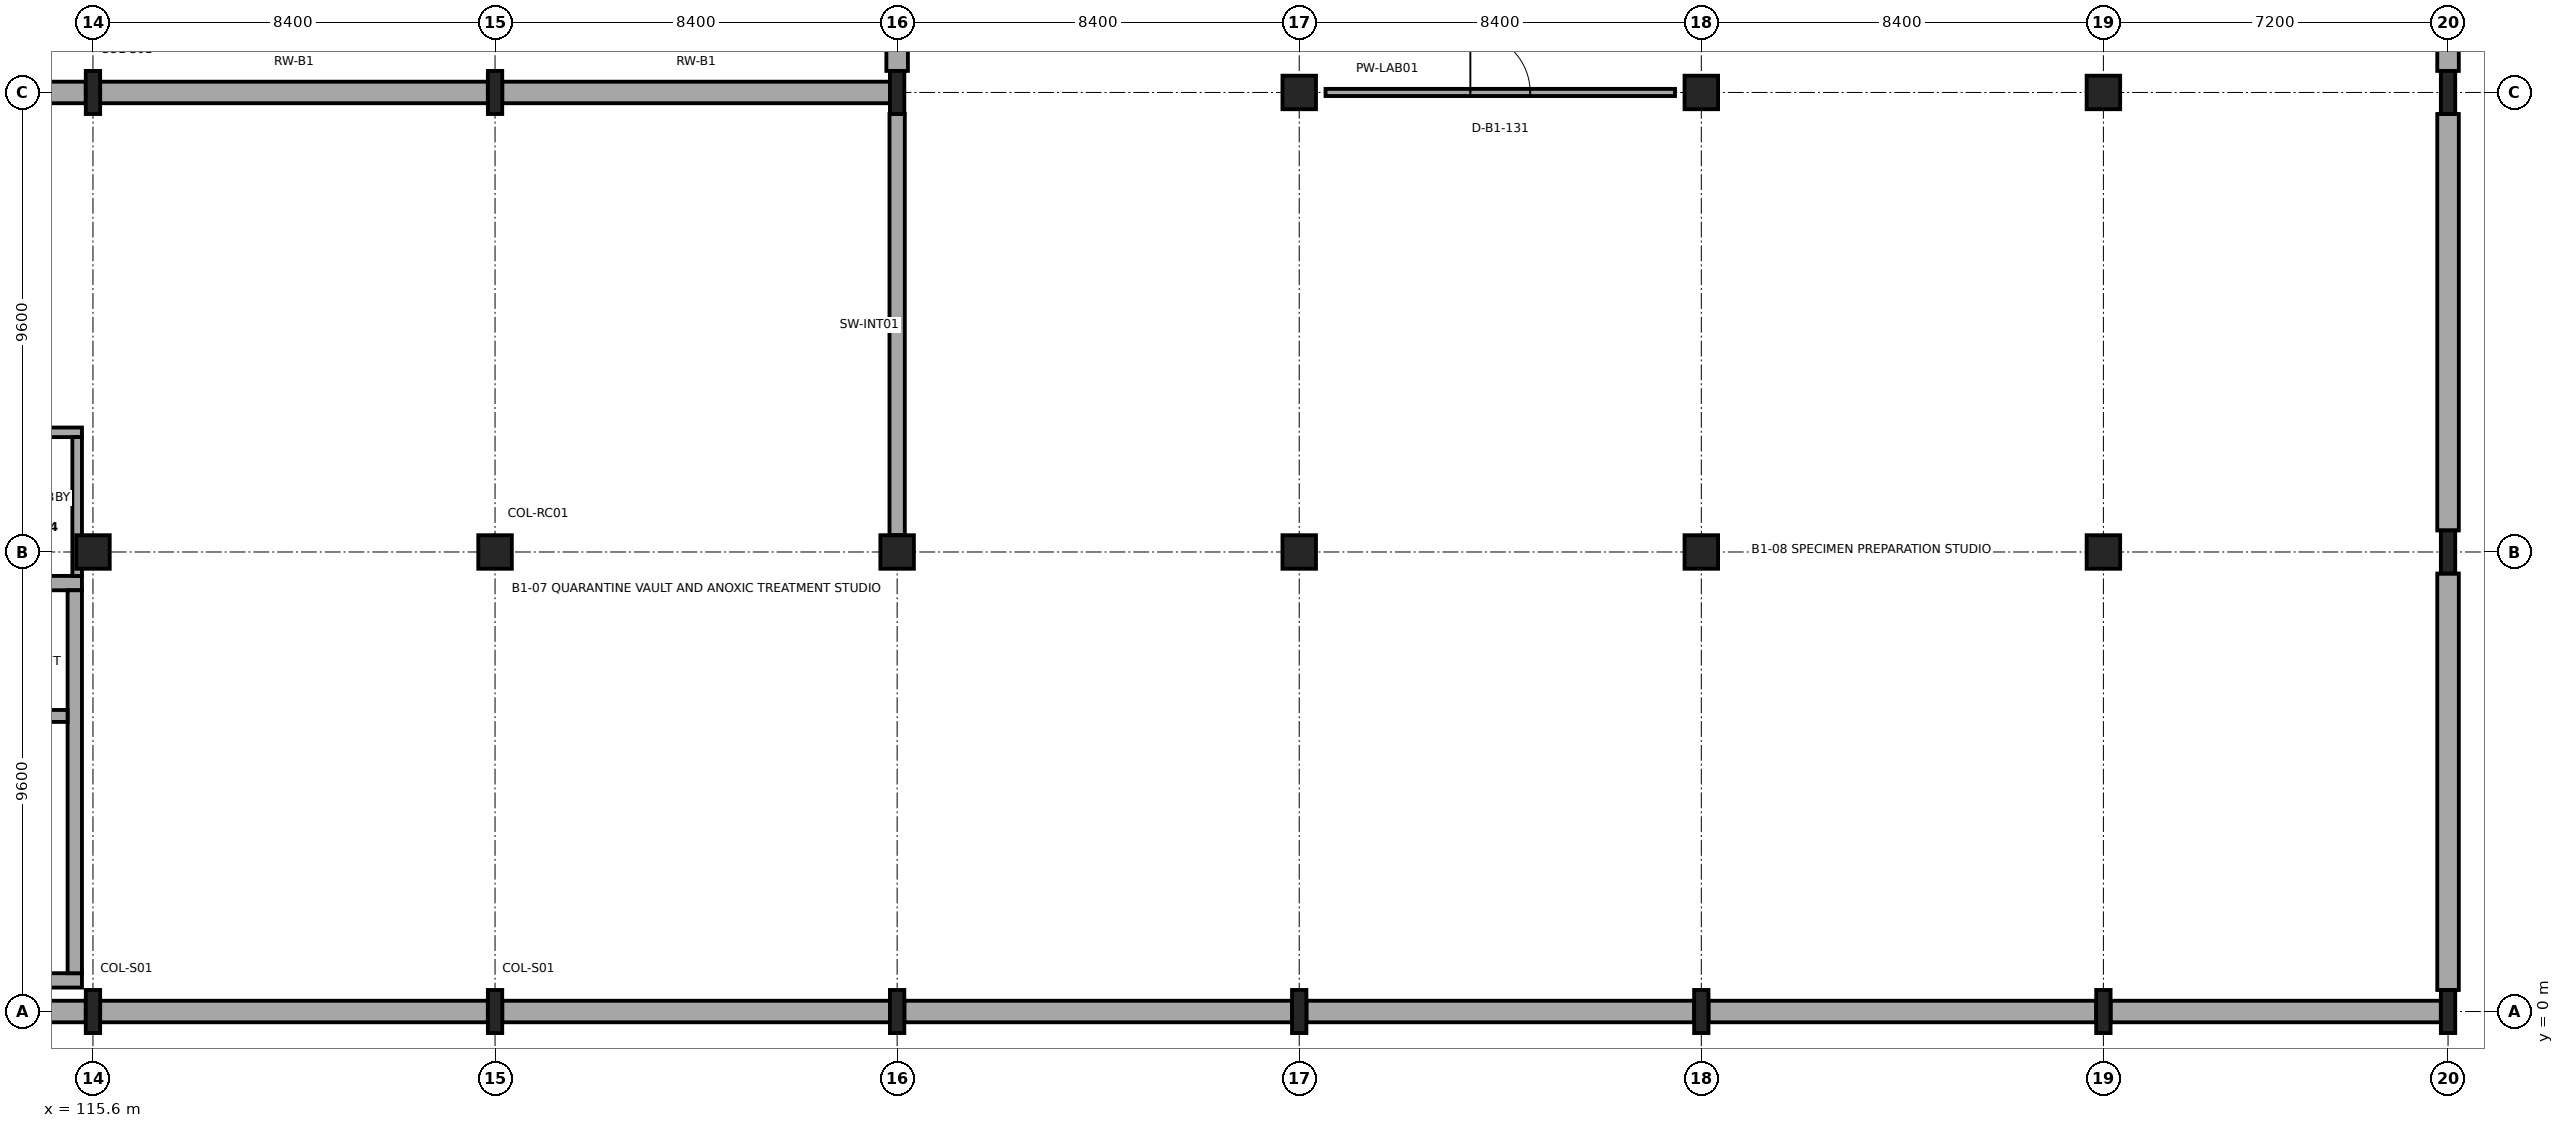
"""IFC4 building model, lengths in metres.
Left out: names, types, materials, properties, quantities, classifications, styles, units other than length and angle.
Written with IfcOpenShell. Run it as: python <this file> out.ifc"""

import sys

from ifc_helpers import new_model, si_unit, direction, frame, frame_2d, origin, origin_2d, place, context, subcontext, project, spatial, rectangle, i_section, extrude, element, fill, save


model = new_model("IFC4")
c1 = context("Model", 3, precision=1e-05, world=origin(), true_north=direction((0.0, 1.0)))
c2 = subcontext(c1, "Body", "Model", "MODEL_VIEW")
j1 = project(units=[si_unit("LENGTHUNIT", "METRE"), si_unit("PLANEANGLEUNIT", "RADIAN")], contexts=[c1])
p1 = place(None, origin())
s1 = spatial("IfcSite", under=j1, at=p1, CompositionType="ELEMENT")
p2 = place(p1, origin())
s2 = spatial("IfcBuilding", under=s1, at=p2, CompositionType="ELEMENT")
p3 = place(p2, frame((0.0, 0.0, -4.8)))
s3 = spatial("IfcBuildingStorey", under=s2, at=p3, CompositionType="ELEMENT", Elevation=-4.8)
p4 = place(p3, frame((115.6, 0.0, 0.0), z_axis=(0.0, 0.0, 1.0), x_axis=(1.0, 0.0, 0.0)))
e1 = element("IfcColumn", 1, at=p4, inside=s3, PredefinedType="COLUMN", context=c2, shape_type="SweptSolid", body=[
    extrude(i_section(OverallWidth=0.3, OverallDepth=0.9, WebThickness=0.019, FlangeThickness=0.035, FilletRadius=0.03, at=origin_2d()), origin(), (0.0, 0.0, 1.0), 4.8),
])
p5 = place(p3, frame((115.6, 9.6, 0.0), z_axis=(0.0, 0.0, 1.0), x_axis=(1.0, 0.0, 0.0)))
e2 = element("IfcColumn", 2, at=p5, inside=s3, PredefinedType="COLUMN", context=c2, shape_type="SweptSolid", body=[
    extrude(rectangle(XDim=0.7, YDim=0.7, at=origin_2d()), origin(), (0.0, 0.0, 1.0), 4.8),
])
for number, where, z_axis, x_axis in (
    (3, (115.6, 19.2, 0.0), (0.0, 0.0, 1.0), (1.0, 0.0, 0.0)),
    (4, (124.0, 0.0, 0.0), (0.0, 0.0, 1.0), (1.0, 0.0, 0.0)),
):
    element("IfcColumn", number, at=place(p3, frame(where, z_axis=z_axis, x_axis=x_axis)), inside=s3, PredefinedType="COLUMN", context=c2, shape_type="SweptSolid", body=[
        extrude(i_section(OverallWidth=0.3, OverallDepth=0.9, WebThickness=0.019, FlangeThickness=0.035, FilletRadius=0.03, at=origin_2d()), origin(), (0.0, 0.0, 1.0), 4.8),
    ])
p6 = place(p3, frame((124.0, 9.6, 0.0), z_axis=(0.0, 0.0, 1.0), x_axis=(1.0, 0.0, 0.0)))
e5 = element("IfcColumn", 5, at=p6, inside=s3, PredefinedType="COLUMN", context=c2, shape_type="SweptSolid", body=[
    extrude(rectangle(XDim=0.7, YDim=0.7, at=origin_2d()), origin(), (0.0, 0.0, 1.0), 4.8),
])
for number, where, z_axis, x_axis in (
    (6, (124.0, 19.2, 0.0), (0.0, 0.0, 1.0), (1.0, 0.0, 0.0)),
    (7, (132.4, 0.0, 0.0), (0.0, 0.0, 1.0), (1.0, 0.0, 0.0)),
):
    element("IfcColumn", number, at=place(p3, frame(where, z_axis=z_axis, x_axis=x_axis)), inside=s3, PredefinedType="COLUMN", context=c2, shape_type="SweptSolid", body=[
        extrude(i_section(OverallWidth=0.3, OverallDepth=0.9, WebThickness=0.019, FlangeThickness=0.035, FilletRadius=0.03, at=origin_2d()), origin(), (0.0, 0.0, 1.0), 4.8),
    ])
p7 = place(p3, frame((132.4, 9.6, 0.0), z_axis=(0.0, 0.0, 1.0), x_axis=(1.0, 0.0, 0.0)))
e8 = element("IfcColumn", 8, at=p7, inside=s3, PredefinedType="COLUMN", context=c2, shape_type="SweptSolid", body=[
    extrude(rectangle(XDim=0.7, YDim=0.7, at=origin_2d()), origin(), (0.0, 0.0, 1.0), 4.8),
])
for number, where, z_axis, x_axis in (
    (9, (132.4, 19.2, 0.0), (0.0, 0.0, 1.0), (1.0, 0.0, 0.0)),
    (10, (140.8, 0.0, 0.0), (0.0, 0.0, 1.0), (1.0, 0.0, 0.0)),
):
    element("IfcColumn", number, at=place(p3, frame(where, z_axis=z_axis, x_axis=x_axis)), inside=s3, PredefinedType="COLUMN", context=c2, shape_type="SweptSolid", body=[
        extrude(i_section(OverallWidth=0.3, OverallDepth=0.9, WebThickness=0.019, FlangeThickness=0.035, FilletRadius=0.03, at=origin_2d()), origin(), (0.0, 0.0, 1.0), 4.8),
    ])
for number, where, z_axis, x_axis in (
    (11, (140.8, 9.6, 0.0), (0.0, 0.0, 1.0), (1.0, 0.0, 0.0)),
    (12, (140.8, 19.2, 0.0), (0.0, 0.0, 1.0), (1.0, 0.0, 0.0)),
):
    element("IfcColumn", number, at=place(p3, frame(where, z_axis=z_axis, x_axis=x_axis)), inside=s3, PredefinedType="COLUMN", context=c2, shape_type="SweptSolid", body=[
        extrude(rectangle(XDim=0.7, YDim=0.7, at=origin_2d()), origin(), (0.0, 0.0, 1.0), 4.8),
    ])
p8 = place(p3, frame((149.2, 0.0, 0.0), z_axis=(0.0, 0.0, 1.0), x_axis=(1.0, 0.0, 0.0)))
e13 = element("IfcColumn", 13, at=p8, inside=s3, PredefinedType="COLUMN", context=c2, shape_type="SweptSolid", body=[
    extrude(i_section(OverallWidth=0.3, OverallDepth=0.9, WebThickness=0.019, FlangeThickness=0.035, FilletRadius=0.03, at=origin_2d()), origin(), (0.0, 0.0, 1.0), 4.8),
])
for number, where, z_axis, x_axis in (
    (14, (149.2, 9.6, 0.0), (0.0, 0.0, 1.0), (1.0, 0.0, 0.0)),
    (15, (149.2, 19.2, 0.0), (0.0, 0.0, 1.0), (1.0, 0.0, 0.0)),
):
    element("IfcColumn", number, at=place(p3, frame(where, z_axis=z_axis, x_axis=x_axis)), inside=s3, PredefinedType="COLUMN", context=c2, shape_type="SweptSolid", body=[
        extrude(rectangle(XDim=0.7, YDim=0.7, at=origin_2d()), origin(), (0.0, 0.0, 1.0), 4.8),
    ])
p9 = place(p3, frame((157.6, 0.0, 0.0), z_axis=(0.0, 0.0, 1.0), x_axis=(1.0, 0.0, 0.0)))
e16 = element("IfcColumn", 16, at=p9, inside=s3, PredefinedType="COLUMN", context=c2, shape_type="SweptSolid", body=[
    extrude(i_section(OverallWidth=0.3, OverallDepth=0.9, WebThickness=0.019, FlangeThickness=0.035, FilletRadius=0.03, at=origin_2d()), origin(), (0.0, 0.0, 1.0), 4.8),
])
for number, where, z_axis, x_axis in (
    (17, (157.6, 9.6, 0.0), (0.0, 0.0, 1.0), (1.0, 0.0, 0.0)),
    (18, (157.6, 19.2, 0.0), (0.0, 0.0, 1.0), (1.0, 0.0, 0.0)),
):
    element("IfcColumn", number, at=place(p3, frame(where, z_axis=z_axis, x_axis=x_axis)), inside=s3, PredefinedType="COLUMN", context=c2, shape_type="SweptSolid", body=[
        extrude(rectangle(XDim=0.7, YDim=0.7, at=origin_2d()), origin(), (0.0, 0.0, 1.0), 4.8),
    ])
for number, where, z_axis, x_axis in (
    (19, (164.8, 0.0, 0.0), (0.0, 0.0, 1.0), (1.0, 0.0, 0.0)),
    (20, (164.8, 9.6, 0.0), (0.0, 0.0, 1.0), (1.0, 0.0, 0.0)),
    (21, (164.8, 19.2, 0.0), (0.0, 0.0, 1.0), (1.0, 0.0, 0.0)),
):
    element("IfcColumn", number, at=place(p3, frame(where, z_axis=z_axis, x_axis=x_axis)), inside=s3, PredefinedType="COLUMN", context=c2, shape_type="SweptSolid", body=[
        extrude(i_section(OverallWidth=0.3, OverallDepth=0.9, WebThickness=0.019, FlangeThickness=0.035, FilletRadius=0.03, at=origin_2d()), origin(), (0.0, 0.0, 1.0), 4.8),
    ])
p10 = place(p3, frame((107.35, 19.2, 0.0), z_axis=(0.0, 0.0, 1.0), x_axis=(1.0, 0.0, 0.0)))
e22 = element("IfcWall", 22, at=p10, inside=s3, PredefinedType="USERDEFINED", context=c2, shape_type="SweptSolid", body=[
    extrude(rectangle(XDim=8.1, YDim=0.45, at=frame_2d((4.05, 0.0))), origin(), (0.0, 0.0, 1.0), 4.48),
])
for number, where, z_axis, x_axis in (
    (23, (115.75, 19.2, 0.0), (0.0, 0.0, 1.0), (1.0, 0.0, 0.0)),
    (24, (124.15, 19.2, 0.0), (0.0, 0.0, 1.0), (1.0, 0.0, 0.0)),
):
    element("IfcWall", number, at=place(p3, frame(where, z_axis=z_axis, x_axis=x_axis)), inside=s3, PredefinedType="USERDEFINED", context=c2, shape_type="SweptSolid", body=[
        extrude(rectangle(XDim=8.1, YDim=0.45, at=frame_2d((4.05, 0.0))), origin(), (0.0, 0.0, 1.0), 4.48),
    ])
for number, where, z_axis, x_axis in (
    (25, (132.4, 19.65, 0.0), (0.0, 0.0, 1.0), (0.0, 1.0, 0.0)),
    (26, (164.8, 25.95, 0.0), (0.0, 0.0, 1.0), (0.0, -1.0, 0.0)),
):
    element("IfcWall", number, at=place(p3, frame(where, z_axis=z_axis, x_axis=x_axis)), inside=s3, PredefinedType="USERDEFINED", context=c2, shape_type="SweptSolid", body=[
        extrude(rectangle(XDim=6.3, YDim=0.45, at=frame_2d((3.15, 0.0))), origin(), (0.0, 0.0, 1.0), 4.48),
    ])
for number, where, z_axis, x_axis in (
    (27, (164.8, 18.75, 0.0), (0.0, 0.0, 1.0), (0.0, -1.0, 0.0)),
    (28, (164.8, 9.15, 0.0), (0.0, 0.0, 1.0), (0.0, -1.0, 0.0)),
):
    element("IfcWall", number, at=place(p3, frame(where, z_axis=z_axis, x_axis=x_axis)), inside=s3, PredefinedType="USERDEFINED", context=c2, shape_type="SweptSolid", body=[
        extrude(rectangle(XDim=8.7, YDim=0.45, at=frame_2d((4.35, 0.0))), origin(), (0.0, 0.0, 1.0), 4.48),
    ])
p11 = place(p3, frame((164.65, 0.0, 0.0), z_axis=(0.0, 0.0, 1.0), x_axis=(-1.0, 0.0, 0.0)))
e29 = element("IfcWall", 29, at=p11, inside=s3, PredefinedType="USERDEFINED", context=c2, shape_type="SweptSolid", body=[
    extrude(rectangle(XDim=6.9, YDim=0.45, at=frame_2d((3.45, 0.0))), origin(), (0.0, 0.0, 1.0), 4.48),
])
p12 = place(p3, frame((157.45, 0.0, 0.0), z_axis=(0.0, 0.0, 1.0), x_axis=(-1.0, 0.0, 0.0)))
e30 = element("IfcWall", 30, at=p12, inside=s3, PredefinedType="USERDEFINED", context=c2, shape_type="SweptSolid", body=[
    extrude(rectangle(XDim=8.1, YDim=0.45, at=frame_2d((4.05, 0.0))), origin(), (0.0, 0.0, 1.0), 4.48),
])
p13 = place(p3, frame((149.05, 0.0, 0.0), z_axis=(0.0, 0.0, 1.0), x_axis=(-1.0, 0.0, 0.0)))
e31 = element("IfcWall", 31, at=p13, inside=s3, PredefinedType="USERDEFINED", context=c2, shape_type="SweptSolid", body=[
    extrude(rectangle(XDim=8.1, YDim=0.45, at=frame_2d((4.05, 0.0))), origin(), (0.0, 0.0, 1.0), 4.48),
])
p14 = place(p3, frame((140.65, 0.0, 0.0), z_axis=(0.0, 0.0, 1.0), x_axis=(-1.0, 0.0, 0.0)))
e32 = element("IfcWall", 32, at=p14, inside=s3, PredefinedType="USERDEFINED", context=c2, shape_type="SweptSolid", body=[
    extrude(rectangle(XDim=8.1, YDim=0.45, at=frame_2d((4.05, 0.0))), origin(), (0.0, 0.0, 1.0), 4.48),
])
for number, where, z_axis, x_axis in (
    (33, (132.25, 0.0, 0.0), (0.0, 0.0, 1.0), (-1.0, 0.0, 0.0)),
    (34, (123.85, 0.0, 0.0), (0.0, 0.0, 1.0), (-1.0, 0.0, 0.0)),
):
    element("IfcWall", number, at=place(p3, frame(where, z_axis=z_axis, x_axis=x_axis)), inside=s3, PredefinedType="USERDEFINED", context=c2, shape_type="SweptSolid", body=[
        extrude(rectangle(XDim=8.1, YDim=0.45, at=frame_2d((4.05, 0.0))), origin(), (0.0, 0.0, 1.0), 4.48),
    ])
p15 = place(p3, frame((115.45, 0.0, 0.0), z_axis=(0.0, 0.0, 1.0), x_axis=(-1.0, 0.0, 0.0)))
e35 = element("IfcWall", 35, at=p15, inside=s3, PredefinedType="USERDEFINED", context=c2, shape_type="SweptSolid", body=[
    extrude(rectangle(XDim=8.1, YDim=0.45, at=frame_2d((4.05, 0.0))), origin(), (0.0, 0.0, 1.0), 4.48),
])
p16 = place(p3, frame((107.43, 0.65, 0.0), z_axis=(0.0, 0.0, 1.0), x_axis=(1.0, 0.0, 0.0)))
e36 = element("IfcWall", 36, at=p16, inside=s3, PredefinedType="SHEAR", context=c2, shape_type="SweptSolid", body=[
    extrude(rectangle(XDim=7.94, YDim=0.3, at=frame_2d((3.97, 0.0))), origin(), (0.0, 0.0, 1.0), 4.5),
])
p17 = place(p3, frame((115.37, 8.95, 0.0), z_axis=(0.0, 0.0, 1.0), x_axis=(-1.0, 0.0, 0.0)))
e37 = element("IfcWall", 37, at=p17, inside=s3, PredefinedType="SHEAR", context=c2, shape_type="SweptSolid", body=[
    extrude(rectangle(XDim=7.94, YDim=0.3, at=frame_2d((3.97, 0.0))), origin(), (0.0, 0.0, 1.0), 4.5),
])
p18 = place(p17, frame((5.17, 0.0, 0.0)))
e38 = element("IfcOpeningElement", 38, at=p18, cuts=e37, PredefinedType="OPENING", context=c2, shape_type="SweptSolid", body=[
    extrude(rectangle(XDim=1.1, YDim=2.2, at=frame_2d((0.55, 1.1))), frame((0.0, 0.16, 0.0), z_axis=(0.0, -1.0, 0.0), x_axis=(1.0, 0.0, 0.0)), (0.0, 0.0, 1.0), 0.32),
])
p19 = place(p17, frame((1.35, 0.0, 0.0)))
e39 = element("IfcOpeningElement", 39, at=p19, cuts=e37, PredefinedType="OPENING", context=c2, shape_type="SweptSolid", body=[
    extrude(rectangle(XDim=1.1, YDim=2.1, at=frame_2d((0.55, 1.05))), frame((0.0, 0.16, 0.0), z_axis=(0.0, -1.0, 0.0), x_axis=(1.0, 0.0, 0.0)), (0.0, 0.0, 1.0), 0.32),
])
p20 = place(p3, frame((115.22, 0.8, 0.0), z_axis=(0.0, 0.0, 1.0), x_axis=(0.0, 1.0, 0.0)))
e40 = element("IfcWall", 40, at=p20, inside=s3, PredefinedType="SHEAR", context=c2, shape_type="SweptSolid", body=[
    extrude(rectangle(XDim=8.0, YDim=0.3, at=frame_2d((4.0, 0.0))), origin(), (0.0, 0.0, 1.0), 4.5),
])
p21 = place(p3, frame((111.87, 6.175, 0.0), z_axis=(0.0, 0.0, 1.0), x_axis=(1.0, 0.0, 0.0)))
e41 = element("IfcWall", 41, at=p21, inside=s3, PredefinedType="SHEAR", context=c2, shape_type="SweptSolid", body=[
    extrude(rectangle(XDim=3.2, YDim=0.25, at=frame_2d((1.6, 0.0))), origin(), (0.0, 0.0, 1.0), 4.5),
])
p22 = place(p3, frame((107.43, 12.1, 0.0), z_axis=(0.0, 0.0, 1.0), x_axis=(1.0, 0.0, 0.0)))
e42 = element("IfcWall", 42, at=p22, inside=s3, PredefinedType="SOLIDWALL", context=c2, shape_type="SweptSolid", body=[
    extrude(rectangle(XDim=7.94, YDim=0.2, at=frame_2d((3.97, 0.0))), origin(), (0.0, 0.0, 1.0), 3.932),
])
p23 = place(p22, frame((3.07, 0.0, 0.0)))
e43 = element("IfcOpeningElement", 43, at=p23, cuts=e42, PredefinedType="OPENING", context=c2, shape_type="SweptSolid", body=[
    extrude(rectangle(XDim=1.8, YDim=2.2, at=frame_2d((0.9, 1.1))), frame((0.0, 0.11, 0.0), z_axis=(0.0, -1.0, 0.0), x_axis=(1.0, 0.0, 0.0)), (0.0, 0.0, 1.0), 0.22),
])
p24 = place(p3, frame((115.27, 12.0, 0.0), z_axis=(0.0, 0.0, 1.0), x_axis=(0.0, -1.0, 0.0)))
e44 = element("IfcWall", 44, at=p24, inside=s3, PredefinedType="SOLIDWALL", context=c2, shape_type="SweptSolid", body=[
    extrude(rectangle(XDim=2.9, YDim=0.2, at=frame_2d((1.45, 0.0))), origin(), (0.0, 0.0, 1.0), 3.932),
])
p25 = place(p3, frame((132.4, 9.95, 0.0), z_axis=(0.0, 0.0, 1.0), x_axis=(0.0, 1.0, 0.0)))
e45 = element("IfcWall", 45, at=p25, inside=s3, PredefinedType="SHEAR", context=c2, shape_type="SweptSolid", body=[
    extrude(rectangle(XDim=8.8, YDim=0.32, at=frame_2d((4.4, 0.0))), origin(), (0.0, 0.0, 1.0), 4.5),
])
p26 = place(p3, frame((141.35, 19.2, 0.0), z_axis=(0.0, 0.0, 1.0), x_axis=(1.0, 0.0, 0.0)))
e46 = element("IfcWall", 46, at=p26, inside=s3, PredefinedType="PARTITIONING", context=c2, shape_type="SweptSolid", body=[
    extrude(rectangle(XDim=7.3, YDim=0.15, at=frame_2d((3.65, 0.0))), origin(), (0.0, 0.0, 1.0), 3.932),
])
p27 = place(p26, frame((3.025, 0.0, 0.0)))
e47 = element("IfcOpeningElement", 47, at=p27, cuts=e46, PredefinedType="OPENING", context=c2, shape_type="SweptSolid", body=[
    extrude(rectangle(XDim=1.25, YDim=2.2, at=frame_2d((0.625, 1.1))), frame((0.0, 0.085, 0.0), z_axis=(0.0, -1.0, 0.0), x_axis=(1.0, 0.0, 0.0)), (0.0, 0.0, 1.0), 0.17),
])
p28 = place(p27, origin())
e48 = element("IfcDoor", 48, at=p28, inside=s3, OperationType="SINGLE_SWING_LEFT", PredefinedType="DOOR", context=c2, shape_type="SweptSolid", body=[
    extrude(rectangle(XDim=1.25, YDim=2.2, at=frame_2d((0.625, 1.1))), frame((0.0, 0.025, 0.0), z_axis=(0.0, -1.0, 0.0), x_axis=(1.0, 0.0, 0.0)), (0.0, 0.0, 1.0), 0.05),
])
fill(e47, e48)
save(model, sys.argv[1])
